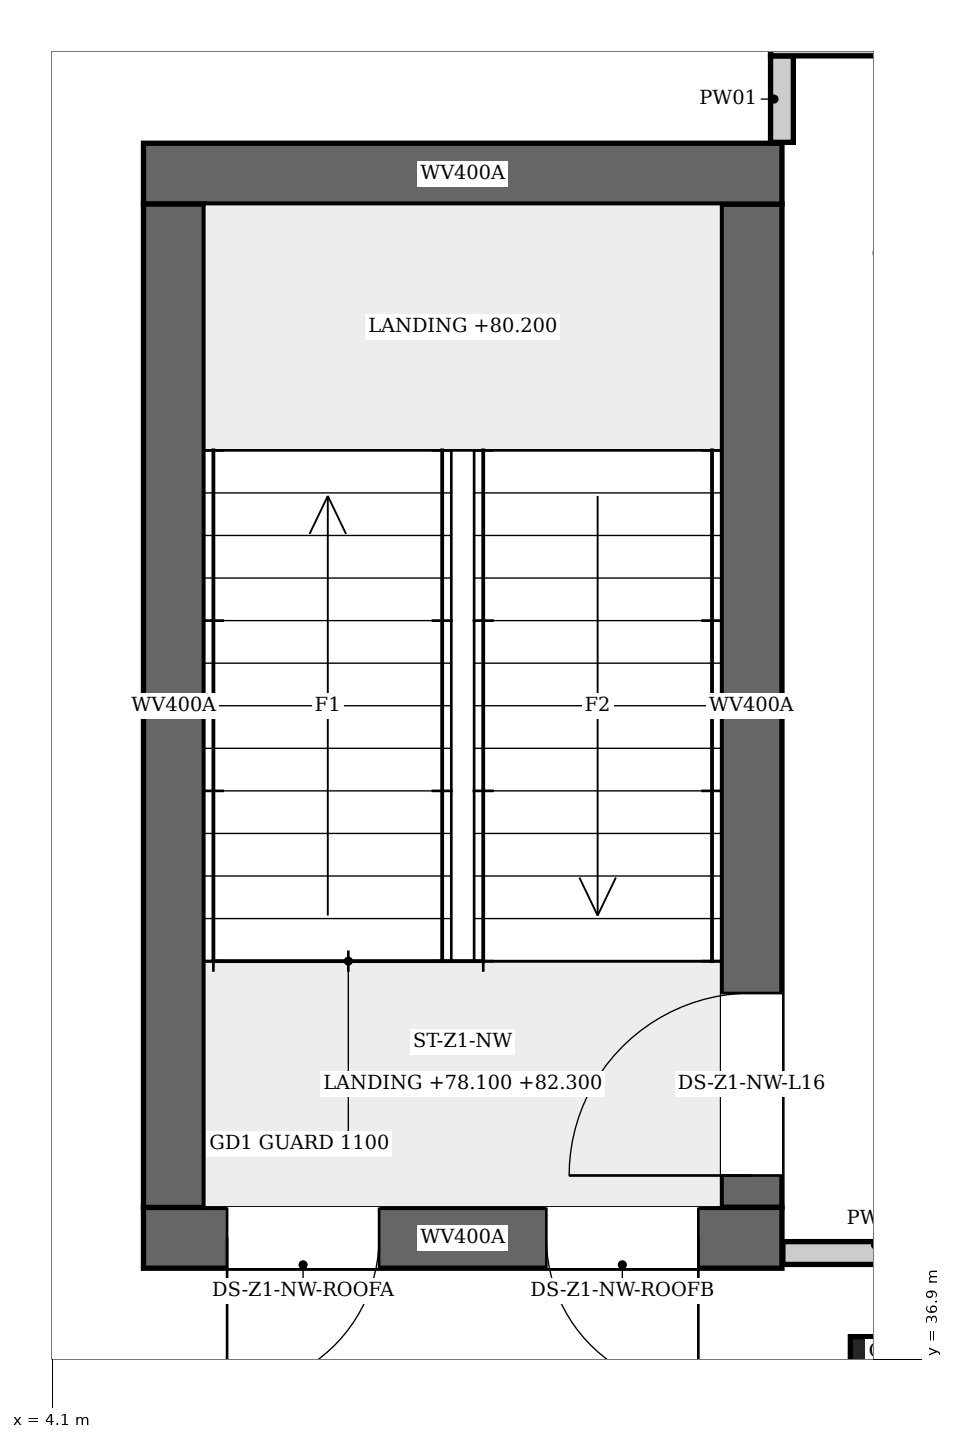
"""IFC4 building model, lengths in metres.
Left out: names, types, materials, properties, quantities, classifications, styles, units other than length and angle.
Written with IfcOpenShell. Run it as: python <this file> out.ifc"""

import sys

from ifc_helpers import new_model, si_unit, direction, frame, frame_2d, origin, origin_2d, place, context, subcontext, project, spatial, rectangle, extrude, element, fill, save


model = new_model("IFC4")
c1 = context("Model", 3, precision=1e-05, world=origin(), true_north=direction((0.0, 1.0)))
c2 = subcontext(c1, "Body", "Model", "MODEL_VIEW")
j1 = project(units=[si_unit("LENGTHUNIT", "METRE"), si_unit("PLANEANGLEUNIT", "RADIAN")], contexts=[c1])
p1 = place(None, origin())
s1 = spatial("IfcSite", under=j1, at=p1, CompositionType="ELEMENT")
p2 = place(p1, origin())
s2 = spatial("IfcBuilding", under=s1, at=p2, CompositionType="ELEMENT")
p3 = place(p2, frame((0.0, 0.0, 78.1)))
s3 = spatial("IfcBuildingStorey", under=s2, at=p3, CompositionType="ELEMENT", Elevation=78.1)
p4 = place(p3, frame((4.7, 37.7, 0.0), z_axis=(0.0, 0.0, 1.0), x_axis=(1.0, 0.0, 0.0)))
e1 = element("IfcWall", 1, at=p4, inside=s3, PredefinedType="SHEAR", context=c2, shape_type="SweptSolid", body=[
    extrude(rectangle(XDim=4.2, YDim=0.4, at=frame_2d((2.1, 0.0))), origin(), (0.0, 0.0, 1.0), 7.1),
])
p5 = place(p4, frame((0.55, 0.0, 4.2)))
e2 = element("IfcOpeningElement", 2, at=p5, cuts=e1, PredefinedType="OPENING", context=c2, shape_type="SweptSolid", body=[
    extrude(rectangle(XDim=1.0, YDim=2.1, at=frame_2d((0.5, 1.05))), frame((0.0, 0.21, 0.0), z_axis=(0.0, -1.0, 0.0), x_axis=(1.0, 0.0, 0.0)), (0.0, 0.0, 1.0), 0.42),
])
p6 = place(p4, frame((2.65, 0.0, 4.2)))
e3 = element("IfcOpeningElement", 3, at=p6, cuts=e1, PredefinedType="OPENING", context=c2, shape_type="SweptSolid", body=[
    extrude(rectangle(XDim=1.0, YDim=2.1, at=frame_2d((0.5, 1.05))), frame((0.0, 0.21, 0.0), z_axis=(0.0, -1.0, 0.0), x_axis=(1.0, 0.0, 0.0)), (0.0, 0.0, 1.0), 0.42),
])
p7 = place(p3, frame((4.7, 44.7, 0.0), z_axis=(0.0, 0.0, 1.0), x_axis=(1.0, 0.0, 0.0)))
e4 = element("IfcWall", 4, at=p7, inside=s3, PredefinedType="SHEAR", context=c2, shape_type="SweptSolid", body=[
    extrude(rectangle(XDim=4.2, YDim=0.4, at=frame_2d((2.1, 0.0))), origin(), (0.0, 0.0, 1.0), 7.1),
])
p8 = place(p3, frame((4.9, 37.9, 0.0), z_axis=(0.0, 0.0, 1.0), x_axis=(0.0, 1.0, 0.0)))
e5 = element("IfcWall", 5, at=p8, inside=s3, PredefinedType="SHEAR", context=c2, shape_type="SweptSolid", body=[
    extrude(rectangle(XDim=6.6, YDim=0.4, at=frame_2d((3.3, 0.0))), origin(), (0.0, 0.0, 1.0), 7.1),
])
p9 = place(p3, frame((8.7, 37.9, 0.0), z_axis=(0.0, 0.0, 1.0), x_axis=(0.0, 1.0, 0.0)))
e6 = element("IfcWall", 6, at=p9, inside=s3, PredefinedType="SHEAR", context=c2, shape_type="SweptSolid", body=[
    extrude(rectangle(XDim=6.6, YDim=0.4, at=frame_2d((3.3, 0.0))), origin(), (0.0, 0.0, 1.0), 7.1),
])
p10 = place(p9, frame((0.21, 0.0, 0.0)))
e7 = element("IfcOpeningElement", 7, at=p10, cuts=e6, PredefinedType="OPENING", context=c2, shape_type="SweptSolid", body=[
    extrude(rectangle(XDim=1.2, YDim=2.1, at=frame_2d((0.6, 1.05))), frame((0.0, 0.21, 0.0), z_axis=(0.0, -1.0, 0.0), x_axis=(1.0, 0.0, 0.0)), (0.0, 0.0, 1.0), 0.42),
])
p11 = place(p3, frame((9.6, 36.8, 0.0), z_axis=(0.0, 0.0, 1.0), x_axis=(1.0, 0.0, 0.0)))
e8 = element("IfcColumn", 8, at=p11, inside=s3, PredefinedType="COLUMN", context=c2, shape_type="SweptSolid", body=[
    extrude(rectangle(XDim=0.5, YDim=0.5, at=origin_2d()), origin(), (0.0, 0.0, 1.0), 3.9),
])
p12 = place(p3, frame((8.9, 44.906, 0.0), z_axis=(0.0, 0.0, 1.0), x_axis=(0.0, 1.0, 0.0)))
e9 = element("IfcWall", 9, at=p12, inside=s3, PredefinedType="PARTITIONING", context=c2, shape_type="SweptSolid", body=[
    extrude(rectangle(XDim=0.569, YDim=0.15, at=frame_2d((0.285, 0.0))), origin(), (0.0, 0.0, 1.0), 3.9),
])
p13 = place(p3, frame((8.825, 45.55, 0.0), z_axis=(0.0, 0.0, 1.0), x_axis=(1.0, 0.0, 0.0)))
e10 = element("IfcWall", 10, at=p13, inside=s3, PredefinedType="PARTITIONING", context=c2, shape_type="SweptSolid", body=[
    extrude(rectangle(XDim=2.55, YDim=0.15, at=frame_2d((1.275, 0.0))), origin(), (0.0, 0.0, 1.0), 3.9),
])
p14 = place(p3, frame((8.906, 37.6, 0.0), z_axis=(0.0, 0.0, 1.0), x_axis=(1.0, 0.0, 0.0)))
e11 = element("IfcWall", 11, at=p14, inside=s3, PredefinedType="PARTITIONING", context=c2, shape_type="SweptSolid", body=[
    extrude(rectangle(XDim=1.219, YDim=0.15, at=frame_2d((0.609, 0.0))), origin(), (0.0, 0.0, 1.0), 3.9),
])
p15 = place(p10, origin())
e12 = element("IfcDoor", 12, at=p15, inside=s3, OperationType="SINGLE_SWING_RIGHT", PredefinedType="DOOR", context=c2, shape_type="SweptSolid", body=[
    extrude(rectangle(XDim=1.2, YDim=2.1, at=frame_2d((0.6, 1.05))), frame((0.0, 0.025, 0.0), z_axis=(0.0, -1.0, 0.0), x_axis=(1.0, 0.0, 0.0)), (0.0, 0.0, 1.0), 0.05),
])
fill(e7, e12)
p16 = place(p5, frame((1.0, 0.0, 0.0), z_axis=(0.0, 0.0, 1.0), x_axis=(-1.0, 0.0, 0.0)))
e13 = element("IfcDoor", 13, at=p16, inside=s3, OperationType="SINGLE_SWING_LEFT", PredefinedType="DOOR", context=c2, shape_type="SweptSolid", body=[
    extrude(rectangle(XDim=1.0, YDim=2.1, at=frame_2d((0.5, 1.05))), frame((0.0, 0.025, 0.0), z_axis=(0.0, -1.0, 0.0), x_axis=(1.0, 0.0, 0.0)), (0.0, 0.0, 1.0), 0.05),
])
fill(e2, e13)
p17 = place(p6, frame((1.0, 0.0, 0.0), z_axis=(0.0, 0.0, 1.0), x_axis=(-1.0, 0.0, 0.0)))
e14 = element("IfcDoor", 14, at=p17, inside=s3, OperationType="SINGLE_SWING_RIGHT", PredefinedType="DOOR", context=c2, shape_type="SweptSolid", body=[
    extrude(rectangle(XDim=1.0, YDim=2.1, at=frame_2d((0.5, 1.05))), frame((0.0, 0.025, 0.0), z_axis=(0.0, -1.0, 0.0), x_axis=(1.0, 0.0, 0.0)), (0.0, 0.0, 1.0), 0.05),
])
fill(e3, e14)
save(model, sys.argv[1])
